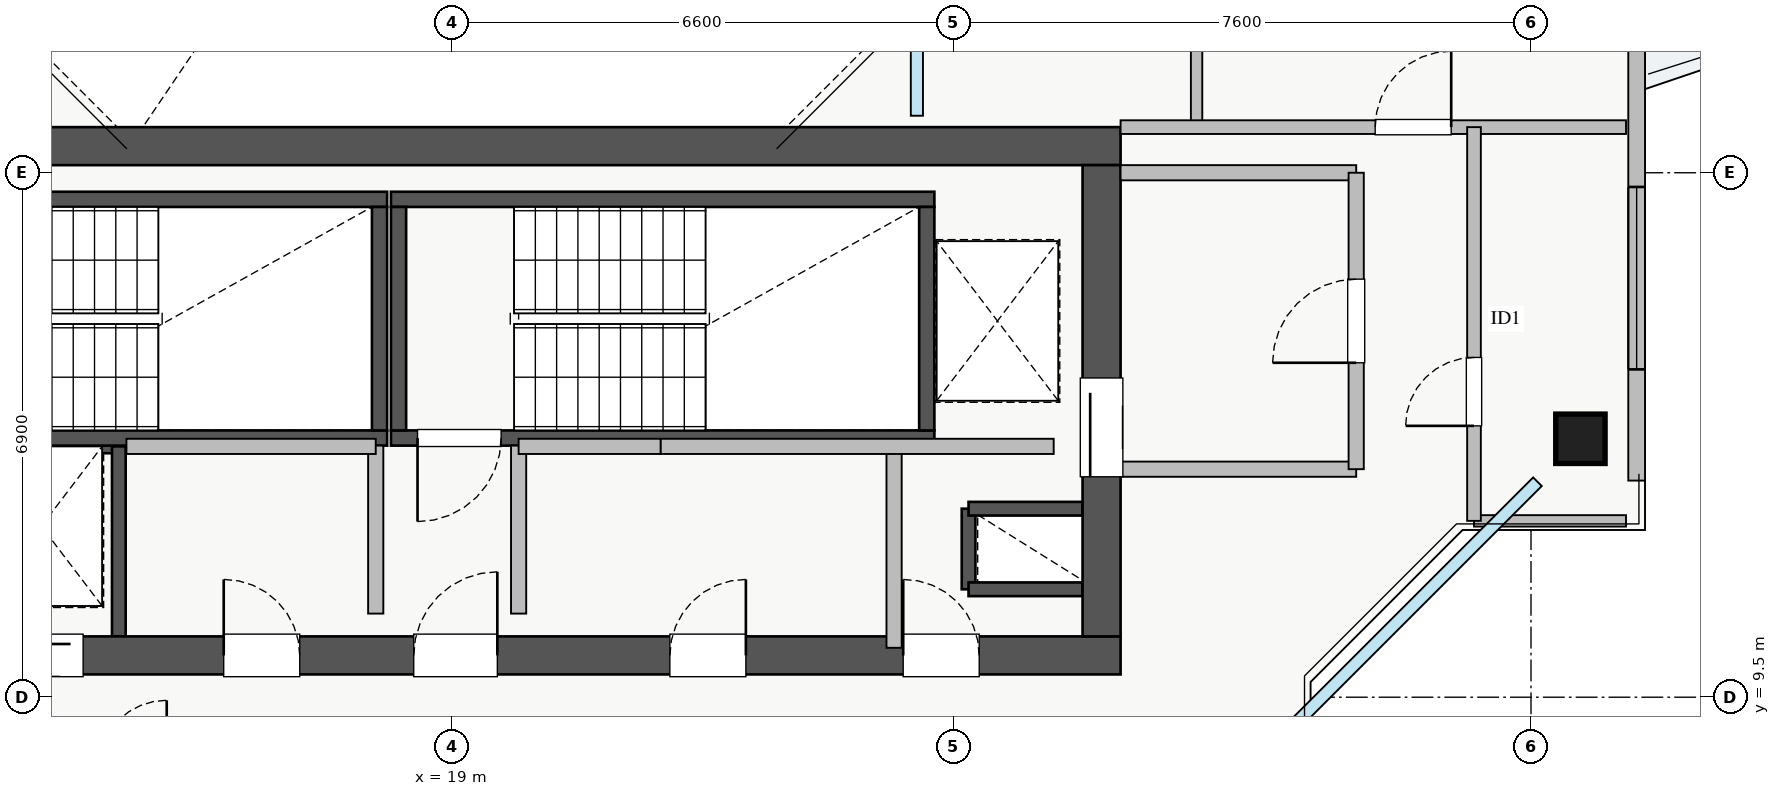
"""IFC4 building model, lengths in metres.
Left out: names, types, materials, properties, quantities, classifications, styles, units other than length and angle.
Written with IfcOpenShell. Run it as: python <this file> out.ifc"""

import sys

from ifc_helpers import new_model, si_unit, direction, frame, frame_2d, origin, origin_2d, place, context, subcontext, project, spatial, rectangle, extrude, source, transform, mapped, element, fill, save


model = new_model("IFC4")
c1 = context("Model", 3, precision=1e-05, world=origin(), true_north=direction((0.0, 1.0)))
c2 = subcontext(c1, "Body", "Model", "MODEL_VIEW")
j1 = project(units=[si_unit("LENGTHUNIT", "METRE"), si_unit("PLANEANGLEUNIT", "RADIAN")], contexts=[c1])
p1 = place(None, origin())
s1 = spatial("IfcSite", under=j1, at=p1, CompositionType="ELEMENT")
p2 = place(p1, origin())
s2 = spatial("IfcBuilding", under=s1, at=p2, CompositionType="ELEMENT")
p3 = place(p2, frame((0.0, 0.0, 237.25)))
s3 = spatial("IfcBuildingStorey", under=s2, at=p3, CompositionType="ELEMENT", Elevation=237.25)
p4 = place(p3, frame((12.68, 12.8, 0.0), z_axis=(0.0, 0.0, 1.0), x_axis=(1.0, 0.0, 0.0)))
e1 = element("IfcWall", 1, at=p4, inside=s3, PredefinedType="SHEAR", context=c2, shape_type="SweptSolid", body=[
    extrude(rectangle(XDim=1.94, YDim=0.18, at=frame_2d((0.97, 0.0))), origin(), (0.0, 0.0, 1.0), 3.07),
])
p5 = place(p3, frame((14.62, 10.3, 0.0), z_axis=(0.0, 0.0, 1.0), x_axis=(0.0, 1.0, 0.0)))
e2 = element("IfcWall", 2, at=p5, inside=s3, PredefinedType="SHEAR", context=c2, shape_type="SweptSolid", body=[
    extrude(rectangle(XDim=2.5, YDim=0.18, at=frame_2d((1.25, 0.0))), origin(), (0.0, 0.0, 1.0), 3.07),
])
p6 = place(p3, frame((25.8, 10.92, 0.0), z_axis=(0.0, 0.0, 1.0), x_axis=(0.0, 1.0, 0.0)))
e3 = element("IfcWall", 3, at=p6, inside=s3, PredefinedType="SHEAR", context=c2, shape_type="SweptSolid", body=[
    extrude(rectangle(XDim=1.06, YDim=0.18, at=frame_2d((0.53, 0.0))), origin(), (0.0, 0.0, 1.0), 3.07),
])
for number, where, z_axis, x_axis in (
    (4, (25.8, 11.98, 0.0), (0.0, 0.0, 1.0), (1.0, 0.0, 0.0)),
    (5, (25.8, 10.92, 0.0), (0.0, 0.0, 1.0), (1.0, 0.0, 0.0)),
):
    element("IfcWall", number, at=place(p3, frame(where, z_axis=z_axis, x_axis=x_axis)), inside=s3, PredefinedType="SHEAR", context=c2, shape_type="SweptSolid", body=[
        extrude(rectangle(XDim=1.5, YDim=0.18, at=frame_2d((0.75, 0.0))), origin(), (0.0, 0.0, 1.0), 3.07),
    ])
p7 = place(p3, frame((10.7, 12.91, 0.0), z_axis=(0.0, 0.0, 1.0), x_axis=(1.0, 0.0, 0.0)))
e6 = element("IfcWall", 6, at=p7, inside=s3, PredefinedType="SHEAR", context=c2, shape_type="SweptSolid", body=[
    extrude(rectangle(XDim=7.45, YDim=0.2, at=frame_2d((3.725, 0.0))), origin(), (0.0, 0.0, 1.0), 3.25),
])
p8 = place(p7, frame((0.35, 0.0, 0.0)))
e7 = element("IfcOpeningElement", 7, at=p8, cuts=e6, PredefinedType="OPENING", context=c2, shape_type="SweptSolid", body=[
    extrude(rectangle(XDim=1.1, YDim=2.05, at=frame_2d((0.55, 1.025))), frame((0.0, 0.11, 0.0), z_axis=(0.0, -1.0, 0.0), x_axis=(1.0, 0.0, 0.0)), (0.0, 0.0, 1.0), 0.22),
])
p9 = place(p3, frame((10.7, 16.05, 0.0), z_axis=(0.0, 0.0, 1.0), x_axis=(1.0, 0.0, 0.0)))
e8 = element("IfcWall", 8, at=p9, inside=s3, PredefinedType="SHEAR", context=c2, shape_type="SweptSolid", body=[
    extrude(rectangle(XDim=7.45, YDim=0.2, at=frame_2d((3.725, 0.0))), origin(), (0.0, 0.0, 1.0), 3.25),
])
p10 = place(p3, frame((18.05, 13.01, 0.0), z_axis=(0.0, 0.0, 1.0), x_axis=(0.0, 1.0, 0.0)))
e9 = element("IfcWall", 9, at=p10, inside=s3, PredefinedType="SHEAR", context=c2, shape_type="SweptSolid", body=[
    extrude(rectangle(XDim=2.94, YDim=0.2, at=frame_2d((1.47, 0.0))), origin(), (0.0, 0.0, 1.0), 3.25),
])
p11 = place(p3, frame((18.2, 12.91, 0.0), z_axis=(0.0, 0.0, 1.0), x_axis=(1.0, 0.0, 0.0)))
e10 = element("IfcWall", 10, at=p11, inside=s3, PredefinedType="SHEAR", context=c2, shape_type="SweptSolid", body=[
    extrude(rectangle(XDim=7.15, YDim=0.2, at=frame_2d((3.575, 0.0))), origin(), (0.0, 0.0, 1.0), 3.25),
])
p12 = place(p11, frame((0.35, 0.0, 0.0)))
e11 = element("IfcOpeningElement", 11, at=p12, cuts=e10, PredefinedType="OPENING", context=c2, shape_type="SweptSolid", body=[
    extrude(rectangle(XDim=1.1, YDim=2.05, at=frame_2d((0.55, 1.025))), frame((0.0, 0.11, 0.0), z_axis=(0.0, -1.0, 0.0), x_axis=(1.0, 0.0, 0.0)), (0.0, 0.0, 1.0), 0.22),
])
p13 = place(p3, frame((18.2, 16.05, 0.0), z_axis=(0.0, 0.0, 1.0), x_axis=(1.0, 0.0, 0.0)))
e12 = element("IfcWall", 12, at=p13, inside=s3, PredefinedType="SHEAR", context=c2, shape_type="SweptSolid", body=[
    extrude(rectangle(XDim=7.15, YDim=0.2, at=frame_2d((3.575, 0.0))), origin(), (0.0, 0.0, 1.0), 3.25),
])
for number, where, z_axis, x_axis in (
    (13, (18.3, 13.01, 0.0), (0.0, 0.0, 1.0), (0.0, 1.0, 0.0)),
    (14, (25.25, 13.01, 0.0), (0.0, 0.0, 1.0), (0.0, 1.0, 0.0)),
):
    element("IfcWall", number, at=place(p3, frame(where, z_axis=z_axis, x_axis=x_axis)), inside=s3, PredefinedType="SHEAR", context=c2, shape_type="SweptSolid", body=[
        extrude(rectangle(XDim=2.94, YDim=0.2, at=frame_2d((1.47, 0.0))), origin(), (0.0, 0.0, 1.0), 3.25),
    ])
p14 = place(p3, frame((10.2, 10.05, 0.0), z_axis=(0.0, 0.0, 1.0), x_axis=(1.0, 0.0, 0.0)))
e15 = element("IfcWall", 15, at=p14, inside=s3, PredefinedType="SHEAR", context=c2, shape_type="SweptSolid", body=[
    extrude(rectangle(XDim=17.6, YDim=0.5, at=frame_2d((8.8, 0.0))), origin(), (0.0, 0.0, 1.0), 3.25),
])
p15 = place(p14, frame((1.15, 0.0, 0.0)))
e16 = element("IfcOpeningElement", 16, at=p15, cuts=e15, PredefinedType="OPENING", context=c2, shape_type="SweptSolid", body=[
    extrude(rectangle(XDim=1.1, YDim=2.05, at=frame_2d((0.55, 1.025))), frame((0.0, 0.26, 0.0), z_axis=(0.0, -1.0, 0.0), x_axis=(1.0, 0.0, 0.0)), (0.0, 0.0, 1.0), 0.52),
])
p16 = place(p14, frame((8.3, 0.0, 0.0)))
e17 = element("IfcOpeningElement", 17, at=p16, cuts=e15, PredefinedType="OPENING", context=c2, shape_type="SweptSolid", body=[
    extrude(rectangle(XDim=1.1, YDim=2.05, at=frame_2d((0.55, 1.025))), frame((0.0, 0.26, 0.0), z_axis=(0.0, -1.0, 0.0), x_axis=(1.0, 0.0, 0.0)), (0.0, 0.0, 1.0), 0.52),
])
p17 = place(p14, frame((2.85, 0.0, 0.0)))
e18 = element("IfcOpeningElement", 18, at=p17, cuts=e15, PredefinedType="OPENING", context=c2, shape_type="SweptSolid", body=[
    extrude(rectangle(XDim=1.1, YDim=2.05, at=frame_2d((0.55, 1.025))), frame((0.0, 0.26, 0.0), z_axis=(0.0, -1.0, 0.0), x_axis=(1.0, 0.0, 0.0)), (0.0, 0.0, 1.0), 0.52),
])
p18 = place(p14, frame((5.8, 0.0, 0.0)))
e19 = element("IfcOpeningElement", 19, at=p18, cuts=e15, PredefinedType="OPENING", context=c2, shape_type="SweptSolid", body=[
    extrude(rectangle(XDim=1.0, YDim=2.05, at=frame_2d((0.5, 1.025))), frame((0.0, 0.26, 0.0), z_axis=(0.0, -1.0, 0.0), x_axis=(1.0, 0.0, 0.0)), (0.0, 0.0, 1.0), 0.52),
])
p19 = place(p14, frame((14.74, 0.0, 0.0)))
e20 = element("IfcOpeningElement", 20, at=p19, cuts=e15, PredefinedType="OPENING", context=c2, shape_type="SweptSolid", body=[
    extrude(rectangle(XDim=1.0, YDim=2.05, at=frame_2d((0.5, 1.025))), frame((0.0, 0.26, 0.0), z_axis=(0.0, -1.0, 0.0), x_axis=(1.0, 0.0, 0.0)), (0.0, 0.0, 1.0), 0.52),
])
p20 = place(p14, frame((11.67, 0.0, 0.0)))
e21 = element("IfcOpeningElement", 21, at=p20, cuts=e15, PredefinedType="OPENING", context=c2, shape_type="SweptSolid", body=[
    extrude(rectangle(XDim=1.0, YDim=2.05, at=frame_2d((0.5, 1.025))), frame((0.0, 0.26, 0.0), z_axis=(0.0, -1.0, 0.0), x_axis=(1.0, 0.0, 0.0)), (0.0, 0.0, 1.0), 0.52),
])
p21 = place(p3, frame((10.2, 16.75, 0.0), z_axis=(0.0, 0.0, 1.0), x_axis=(1.0, 0.0, 0.0)))
e22 = element("IfcWall", 22, at=p21, inside=s3, PredefinedType="SHEAR", context=c2, shape_type="SweptSolid", body=[
    extrude(rectangle(XDim=17.6, YDim=0.5, at=frame_2d((8.8, 0.0))), origin(), (0.0, 0.0, 1.0), 3.25),
])
p22 = place(p3, frame((27.55, 10.3, 0.0), z_axis=(0.0, 0.0, 1.0), x_axis=(0.0, 1.0, 0.0)))
e23 = element("IfcWall", 23, at=p22, inside=s3, PredefinedType="SHEAR", context=c2, shape_type="SweptSolid", body=[
    extrude(rectangle(XDim=6.2, YDim=0.5, at=frame_2d((3.1, 0.0))), origin(), (0.0, 0.0, 1.0), 3.25),
])
p23 = place(p22, frame((2.1, 0.0, 0.0)))
e24 = element("IfcOpeningElement", 24, at=p23, cuts=e23, PredefinedType="OPENING", context=c2, shape_type="SweptSolid", body=[
    extrude(rectangle(XDim=1.3, YDim=2.05, at=frame_2d((0.65, 1.025))), frame((0.0, 0.26, 0.0), z_axis=(0.0, -1.0, 0.0), x_axis=(1.0, 0.0, 0.0)), (0.0, 0.0, 1.0), 0.52),
])
m1 = source(origin(), c2, "Body", "SweptSolid", [
    extrude(rectangle(XDim=0.65, YDim=0.65, at=origin_2d()), origin(), (0.0, 0.0, 1.0), 3.25),
])
p24 = place(p3, frame((33.85, 12.9, 0.0), z_axis=(0.0, 0.0, 1.0), x_axis=(1.0, 0.0, 0.0)))
e25 = element("IfcColumn", 25, at=p24, inside=s3, PredefinedType="COLUMN", context=c2, shape_type="MappedRepresentation", body=[
    mapped(m1, transform((0.0, 0.0, 0.0), x_axis=(1.0, 0.0, 0.0), y_axis=(0.0, 1.0, 0.0), z_axis=(0.0, 0.0, 1.0), scale=1.0)),
])
p25 = place(p3, frame((34.59, 12.35, 0.0), z_axis=(0.0, 0.0, 1.0), x_axis=(0.0, 1.0, 0.0)))
e26 = element("IfcWall", 26, at=p25, inside=s3, PredefinedType="STANDARD", context=c2, shape_type="SweptSolid", body=[
    extrude(rectangle(XDim=21.3, YDim=0.22, at=frame_2d((10.65, 0.0))), origin(), (0.0, 0.0, 1.0), 2.61),
])
p26 = place(p25, frame((11.5, 0.0, 0.0)))
e27 = element("IfcOpeningElement", 27, at=p26, cuts=e26, PredefinedType="OPENING", context=c2, shape_type="SweptSolid", body=[
    extrude(rectangle(XDim=1.2, YDim=2.1, at=frame_2d((0.6, 1.05))), frame((0.0, 0.12, 0.0), z_axis=(0.0, -1.0, 0.0), x_axis=(1.0, 0.0, 0.0)), (0.0, 0.0, 1.0), 0.24),
])
p27 = place(p25, frame((1.463, 0.0, 0.9)))
e28 = element("IfcOpeningElement", 28, at=p27, cuts=e26, PredefinedType="OPENING", context=c2, shape_type="SweptSolid", body=[
    extrude(rectangle(XDim=2.4, YDim=1.48, at=frame_2d((1.2, 0.74))), frame((0.0, 0.12, 0.0), z_axis=(0.0, -1.0, 0.0), x_axis=(1.0, 0.0, 0.0)), (0.0, 0.0, 1.0), 0.24),
])
p28 = place(p25, frame((17.588, 0.0, 0.9)))
e29 = element("IfcOpeningElement", 29, at=p28, cuts=e26, PredefinedType="OPENING", context=c2, shape_type="SweptSolid", body=[
    extrude(rectangle(XDim=2.1, YDim=1.48, at=frame_2d((1.05, 0.74))), frame((0.0, 0.12, 0.0), z_axis=(0.0, -1.0, 0.0), x_axis=(1.0, 0.0, 0.0)), (0.0, 0.0, 1.0), 0.24),
])
for number, where, z_axis, x_axis in (
    (30, (27.8, 16.4, 0.0), (0.0, 0.0, 1.0), (1.0, 0.0, 0.0)),
    (31, (27.8, 12.5, 0.0), (0.0, 0.0, 1.0), (1.0, 0.0, 0.0)),
):
    element("IfcWall", number, at=place(p3, frame(where, z_axis=z_axis, x_axis=x_axis)), inside=s3, PredefinedType="PARTITIONING", context=c2, shape_type="SweptSolid", body=[
        extrude(rectangle(XDim=3.1, YDim=0.2, at=frame_2d((1.55, 0.0))), origin(), (0.0, 0.0, 1.0), 3.07),
    ])
p29 = place(p3, frame((30.9, 12.5, 0.0), z_axis=(0.0, 0.0, 1.0), x_axis=(0.0, 1.0, 0.0)))
e32 = element("IfcWall", 32, at=p29, inside=s3, PredefinedType="PARTITIONING", context=c2, shape_type="SweptSolid", body=[
    extrude(rectangle(XDim=3.9, YDim=0.2, at=frame_2d((1.95, 0.0))), origin(), (0.0, 0.0, 1.0), 2.815),
])
p30 = place(p29, frame((1.4, 0.0, 0.0)))
e33 = element("IfcOpeningElement", 33, at=p30, cuts=e32, PredefinedType="OPENING", context=c2, shape_type="SweptSolid", body=[
    extrude(rectangle(XDim=1.1, YDim=2.05, at=frame_2d((0.55, 1.025))), frame((0.0, 0.11, 0.0), z_axis=(0.0, -1.0, 0.0), x_axis=(1.0, 0.0, 0.0)), (0.0, 0.0, 1.0), 0.22),
])
for number, where, z_axis, x_axis in (
    (34, (18.0, 10.6, 0.0), (0.0, 0.0, 1.0), (0.0, 1.0, 0.0)),
    (35, (19.88, 10.6, 0.0), (0.0, 0.0, 1.0), (0.0, 1.0, 0.0)),
):
    element("IfcWall", number, at=place(p3, frame(where, z_axis=z_axis, x_axis=x_axis)), inside=s3, PredefinedType="PARTITIONING", context=c2, shape_type="SweptSolid", body=[
        extrude(rectangle(XDim=2.21, YDim=0.2, at=frame_2d((1.105, 0.0))), origin(), (0.0, 0.0, 1.0), 3.07),
    ])
p31 = place(p3, frame((14.72, 12.8, 0.0), z_axis=(0.0, 0.0, 1.0), x_axis=(1.0, 0.0, 0.0)))
e36 = element("IfcWall", 36, at=p31, inside=s3, PredefinedType="PARTITIONING", context=c2, shape_type="SweptSolid", body=[
    extrude(rectangle(XDim=3.28, YDim=0.2, at=frame_2d((1.64, 0.0))), origin(), (0.0, 0.0, 1.0), 3.07),
])
p32 = place(p3, frame((24.82, 10.15, 0.0), z_axis=(0.0, 0.0, 1.0), x_axis=(0.0, 1.0, 0.0)))
e37 = element("IfcWall", 37, at=p32, inside=s3, PredefinedType="PARTITIONING", context=c2, shape_type="SweptSolid", body=[
    extrude(rectangle(XDim=2.65, YDim=0.2, at=frame_2d((1.325, 0.0))), origin(), (0.0, 0.0, 1.0), 3.07),
])
p33 = place(p3, frame((19.88, 12.8, 0.0), z_axis=(0.0, 0.0, 1.0), x_axis=(1.0, 0.0, 0.0)))
e38 = element("IfcWall", 38, at=p33, inside=s3, PredefinedType="PARTITIONING", context=c2, shape_type="SweptSolid", body=[
    extrude(rectangle(XDim=1.87, YDim=0.2, at=frame_2d((0.935, 0.0))), origin(), (0.0, 0.0, 1.0), 3.07),
])
p34 = place(p3, frame((21.75, 12.8, 0.0), z_axis=(0.0, 0.0, 1.0), x_axis=(1.0, 0.0, 0.0)))
e39 = element("IfcWall", 39, at=p34, inside=s3, PredefinedType="PARTITIONING", context=c2, shape_type="SweptSolid", body=[
    extrude(rectangle(XDim=5.17, YDim=0.2, at=frame_2d((2.585, 0.0))), origin(), (0.0, 0.0, 1.0), 3.07),
])
p35 = place(p3, frame((28.8, 17.0, 0.0), z_axis=(0.0, 0.0, 1.0), x_axis=(0.0, 1.0, 0.0)))
e40 = element("IfcWall", 40, at=p35, inside=s3, PredefinedType="PARTITIONING", context=c2, shape_type="SweptSolid", body=[
    extrude(rectangle(XDim=6.0, YDim=0.15, at=frame_2d((3.0, 0.0))), origin(), (0.0, 0.0, 1.0), 3.07),
])
p36 = place(p35, frame((2.2, 0.0, 0.0)))
e41 = element("IfcOpeningElement", 41, at=p36, cuts=e40, PredefinedType="OPENING", context=c2, shape_type="SweptSolid", body=[
    extrude(rectangle(XDim=0.9, YDim=2.05, at=frame_2d((0.45, 1.025))), frame((0.0, 0.085, 0.0), z_axis=(0.0, -1.0, 0.0), x_axis=(1.0, 0.0, 0.0)), (0.0, 0.0, 1.0), 0.17),
])
p37 = place(p3, frame((27.8, 17.0, 0.0), z_axis=(0.0, 0.0, 1.0), x_axis=(1.0, 0.0, 0.0)))
e42 = element("IfcWall", 42, at=p37, inside=s3, PredefinedType="PARTITIONING", context=c2, shape_type="SweptSolid", body=[
    extrude(rectangle(XDim=6.65, YDim=0.18, at=frame_2d((3.325, 0.0))), origin(), (0.0, 0.0, 1.0), 3.07),
])
p38 = place(p37, frame((3.35, 0.0, 0.0)))
e43 = element("IfcOpeningElement", 43, at=p38, cuts=e42, PredefinedType="OPENING", context=c2, shape_type="SweptSolid", body=[
    extrude(rectangle(XDim=1.0, YDim=2.05, at=frame_2d((0.5, 1.025))), frame((0.0, 0.1, 0.0), z_axis=(0.0, -1.0, 0.0), x_axis=(1.0, 0.0, 0.0)), (0.0, 0.0, 1.0), 0.2),
])
p39 = place(p3, frame((32.45, 11.82, 0.0), z_axis=(0.0, 0.0, 1.0), x_axis=(1.0, 0.0, 0.0)))
e44 = element("IfcWall", 44, at=p39, inside=s3, PredefinedType="PARTITIONING", context=c2, shape_type="SweptSolid", body=[
    extrude(rectangle(XDim=2.0, YDim=0.15, at=frame_2d((1.0, 0.0))), origin(), (0.0, 0.0, 1.0), 3.07),
])
p40 = place(p3, frame((32.45, 11.82, 0.0), z_axis=(0.0, 0.0, 1.0), x_axis=(0.0, 1.0, 0.0)))
e45 = element("IfcWall", 45, at=p40, inside=s3, PredefinedType="PARTITIONING", context=c2, shape_type="SweptSolid", body=[
    extrude(rectangle(XDim=5.18, YDim=0.18, at=frame_2d((2.59, 0.0))), origin(), (0.0, 0.0, 1.0), 3.07),
])
p41 = place(p40, frame((1.25, 0.0, 0.0)))
e46 = element("IfcOpeningElement", 46, at=p41, cuts=e45, PredefinedType="OPENING", context=c2, shape_type="SweptSolid", body=[
    extrude(rectangle(XDim=0.9, YDim=2.05, at=frame_2d((0.45, 1.025))), frame((0.0, 0.1, 0.0), z_axis=(0.0, -1.0, 0.0), x_axis=(1.0, 0.0, 0.0)), (0.0, 0.0, 1.0), 0.2),
])
m2 = source(origin(), c2, "Body", "SweptSolid", [
    extrude(rectangle(XDim=2.4, YDim=1.48, at=frame_2d((1.2, 0.74))), frame((0.0, 0.03, 0.0), z_axis=(0.0, -1.0, 0.0), x_axis=(1.0, 0.0, 0.0)), (0.0, 0.0, 1.0), 0.06),
])
p42 = place(p27, origin())
e47 = element("IfcWindow", 47, at=p42, inside=s3, PartitioningType="TRIPLE_PANEL_VERTICAL", PredefinedType="WINDOW", context=c2, shape_type="MappedRepresentation", body=[
    mapped(m2, transform((0.0, 0.0, 0.0), x_axis=(1.0, 0.0, 0.0), y_axis=(0.0, 1.0, 0.0), z_axis=(0.0, 0.0, 1.0), scale=1.0)),
])
fill(e28, e47)
m3 = source(origin(), c2, "Body", "SweptSolid", [
    extrude(rectangle(XDim=1.3, YDim=2.05, at=frame_2d((0.65, 1.025))), frame((0.0, 0.025, 0.0), z_axis=(0.0, -1.0, 0.0), x_axis=(1.0, 0.0, 0.0)), (0.0, 0.0, 1.0), 0.05),
])
p43 = place(p23, origin())
e48 = element("IfcDoor", 48, at=p43, inside=s3, OperationType="SLIDING_TO_RIGHT", PredefinedType="DOOR", context=c2, shape_type="MappedRepresentation", body=[
    mapped(m3, transform((0.0, 0.0, 0.0), x_axis=(1.0, 0.0, 0.0), y_axis=(0.0, 1.0, 0.0), z_axis=(0.0, 0.0, 1.0), scale=1.0)),
])
fill(e24, e48)
m4 = source(origin(), c2, "Body", "SweptSolid", [
    extrude(rectangle(XDim=1.1, YDim=2.05, at=frame_2d((0.55, 1.025))), frame((0.0, 0.025, 0.0), z_axis=(0.0, -1.0, 0.0), x_axis=(1.0, 0.0, 0.0)), (0.0, 0.0, 1.0), 0.05),
])
p44 = place(p16, origin())
e49 = element("IfcDoor", 49, at=p44, inside=s3, OperationType="SINGLE_SWING_RIGHT", PredefinedType="DOOR", context=c2, shape_type="MappedRepresentation", body=[
    mapped(m4, transform((0.0, 0.0, 0.0), x_axis=(1.0, 0.0, 0.0), y_axis=(0.0, 1.0, 0.0), z_axis=(0.0, 0.0, 1.0), scale=1.0)),
])
fill(e17, e49)
p45 = place(p12, frame((1.1, 0.0, 0.0), z_axis=(0.0, 0.0, 1.0), x_axis=(-1.0, 0.0, 0.0)))
e50 = element("IfcDoor", 50, at=p45, inside=s3, OperationType="SINGLE_SWING_LEFT", PredefinedType="DOOR", context=c2, shape_type="MappedRepresentation", body=[
    mapped(m4, transform((0.0, 0.0, 0.0), x_axis=(1.0, 0.0, 0.0), y_axis=(0.0, 1.0, 0.0), z_axis=(0.0, 0.0, 1.0), scale=1.0)),
])
fill(e11, e50)
p46 = place(p17, origin())
e51 = element("IfcDoor", 51, at=p46, inside=s3, OperationType="SLIDING_TO_RIGHT", PredefinedType="DOOR", context=c2, shape_type="MappedRepresentation", body=[
    mapped(m4, transform((0.0, 0.0, 0.0), x_axis=(1.0, 0.0, 0.0), y_axis=(0.0, 1.0, 0.0), z_axis=(0.0, 0.0, 1.0), scale=1.0)),
])
fill(e18, e51)
m5 = source(origin(), c2, "Body", "SweptSolid", [
    extrude(rectangle(XDim=1.0, YDim=2.05, at=frame_2d((0.5, 1.025))), frame((0.0, 0.025, 0.0), z_axis=(0.0, -1.0, 0.0), x_axis=(1.0, 0.0, 0.0)), (0.0, 0.0, 1.0), 0.05),
])
p47 = place(p18, origin())
e52 = element("IfcDoor", 52, at=p47, inside=s3, OperationType="SINGLE_SWING_LEFT", PredefinedType="DOOR", context=c2, shape_type="MappedRepresentation", body=[
    mapped(m5, transform((0.0, 0.0, 0.0), x_axis=(1.0, 0.0, 0.0), y_axis=(0.0, 1.0, 0.0), z_axis=(0.0, 0.0, 1.0), scale=1.0)),
])
fill(e19, e52)
p48 = place(p19, origin())
e53 = element("IfcDoor", 53, at=p48, inside=s3, OperationType="SINGLE_SWING_LEFT", PredefinedType="DOOR", context=c2, shape_type="MappedRepresentation", body=[
    mapped(m5, transform((0.0, 0.0, 0.0), x_axis=(1.0, 0.0, 0.0), y_axis=(0.0, 1.0, 0.0), z_axis=(0.0, 0.0, 1.0), scale=1.0)),
])
fill(e20, e53)
p49 = place(p20, origin())
e54 = element("IfcDoor", 54, at=p49, inside=s3, OperationType="SINGLE_SWING_RIGHT", PredefinedType="DOOR", context=c2, shape_type="MappedRepresentation", body=[
    mapped(m5, transform((0.0, 0.0, 0.0), x_axis=(1.0, 0.0, 0.0), y_axis=(0.0, 1.0, 0.0), z_axis=(0.0, 0.0, 1.0), scale=1.0)),
])
fill(e21, e54)
p50 = place(p30, origin())
e55 = element("IfcDoor", 55, at=p50, inside=s3, OperationType="SINGLE_SWING_LEFT", PredefinedType="DOOR", context=c2, shape_type="MappedRepresentation", body=[
    mapped(m4, transform((0.0, 0.0, 0.0), x_axis=(1.0, 0.0, 0.0), y_axis=(0.0, 1.0, 0.0), z_axis=(0.0, 0.0, 1.0), scale=1.0)),
])
fill(e33, e55)
p51 = place(p38, origin())
e56 = element("IfcDoor", 56, at=p51, inside=s3, OperationType="SINGLE_SWING_RIGHT", PredefinedType="DOOR", context=c2, shape_type="MappedRepresentation", body=[
    mapped(m5, transform((0.0, 0.0, 0.0), x_axis=(1.0, 0.0, 0.0), y_axis=(0.0, 1.0, 0.0), z_axis=(0.0, 0.0, 1.0), scale=1.0)),
])
fill(e43, e56)
m6 = source(origin(), c2, "Body", "SweptSolid", [
    extrude(rectangle(XDim=0.9, YDim=2.05, at=frame_2d((0.45, 1.025))), frame((0.0, 0.025, 0.0), z_axis=(0.0, -1.0, 0.0), x_axis=(1.0, 0.0, 0.0)), (0.0, 0.0, 1.0), 0.05),
])
p52 = place(p41, origin())
e57 = element("IfcDoor", 57, at=p52, inside=s3, OperationType="SINGLE_SWING_LEFT", PredefinedType="DOOR", context=c2, shape_type="MappedRepresentation", body=[
    mapped(m6, transform((0.0, 0.0, 0.0), x_axis=(1.0, 0.0, 0.0), y_axis=(0.0, 1.0, 0.0), z_axis=(0.0, 0.0, 1.0), scale=1.0)),
])
fill(e46, e57)
save(model, sys.argv[1])
